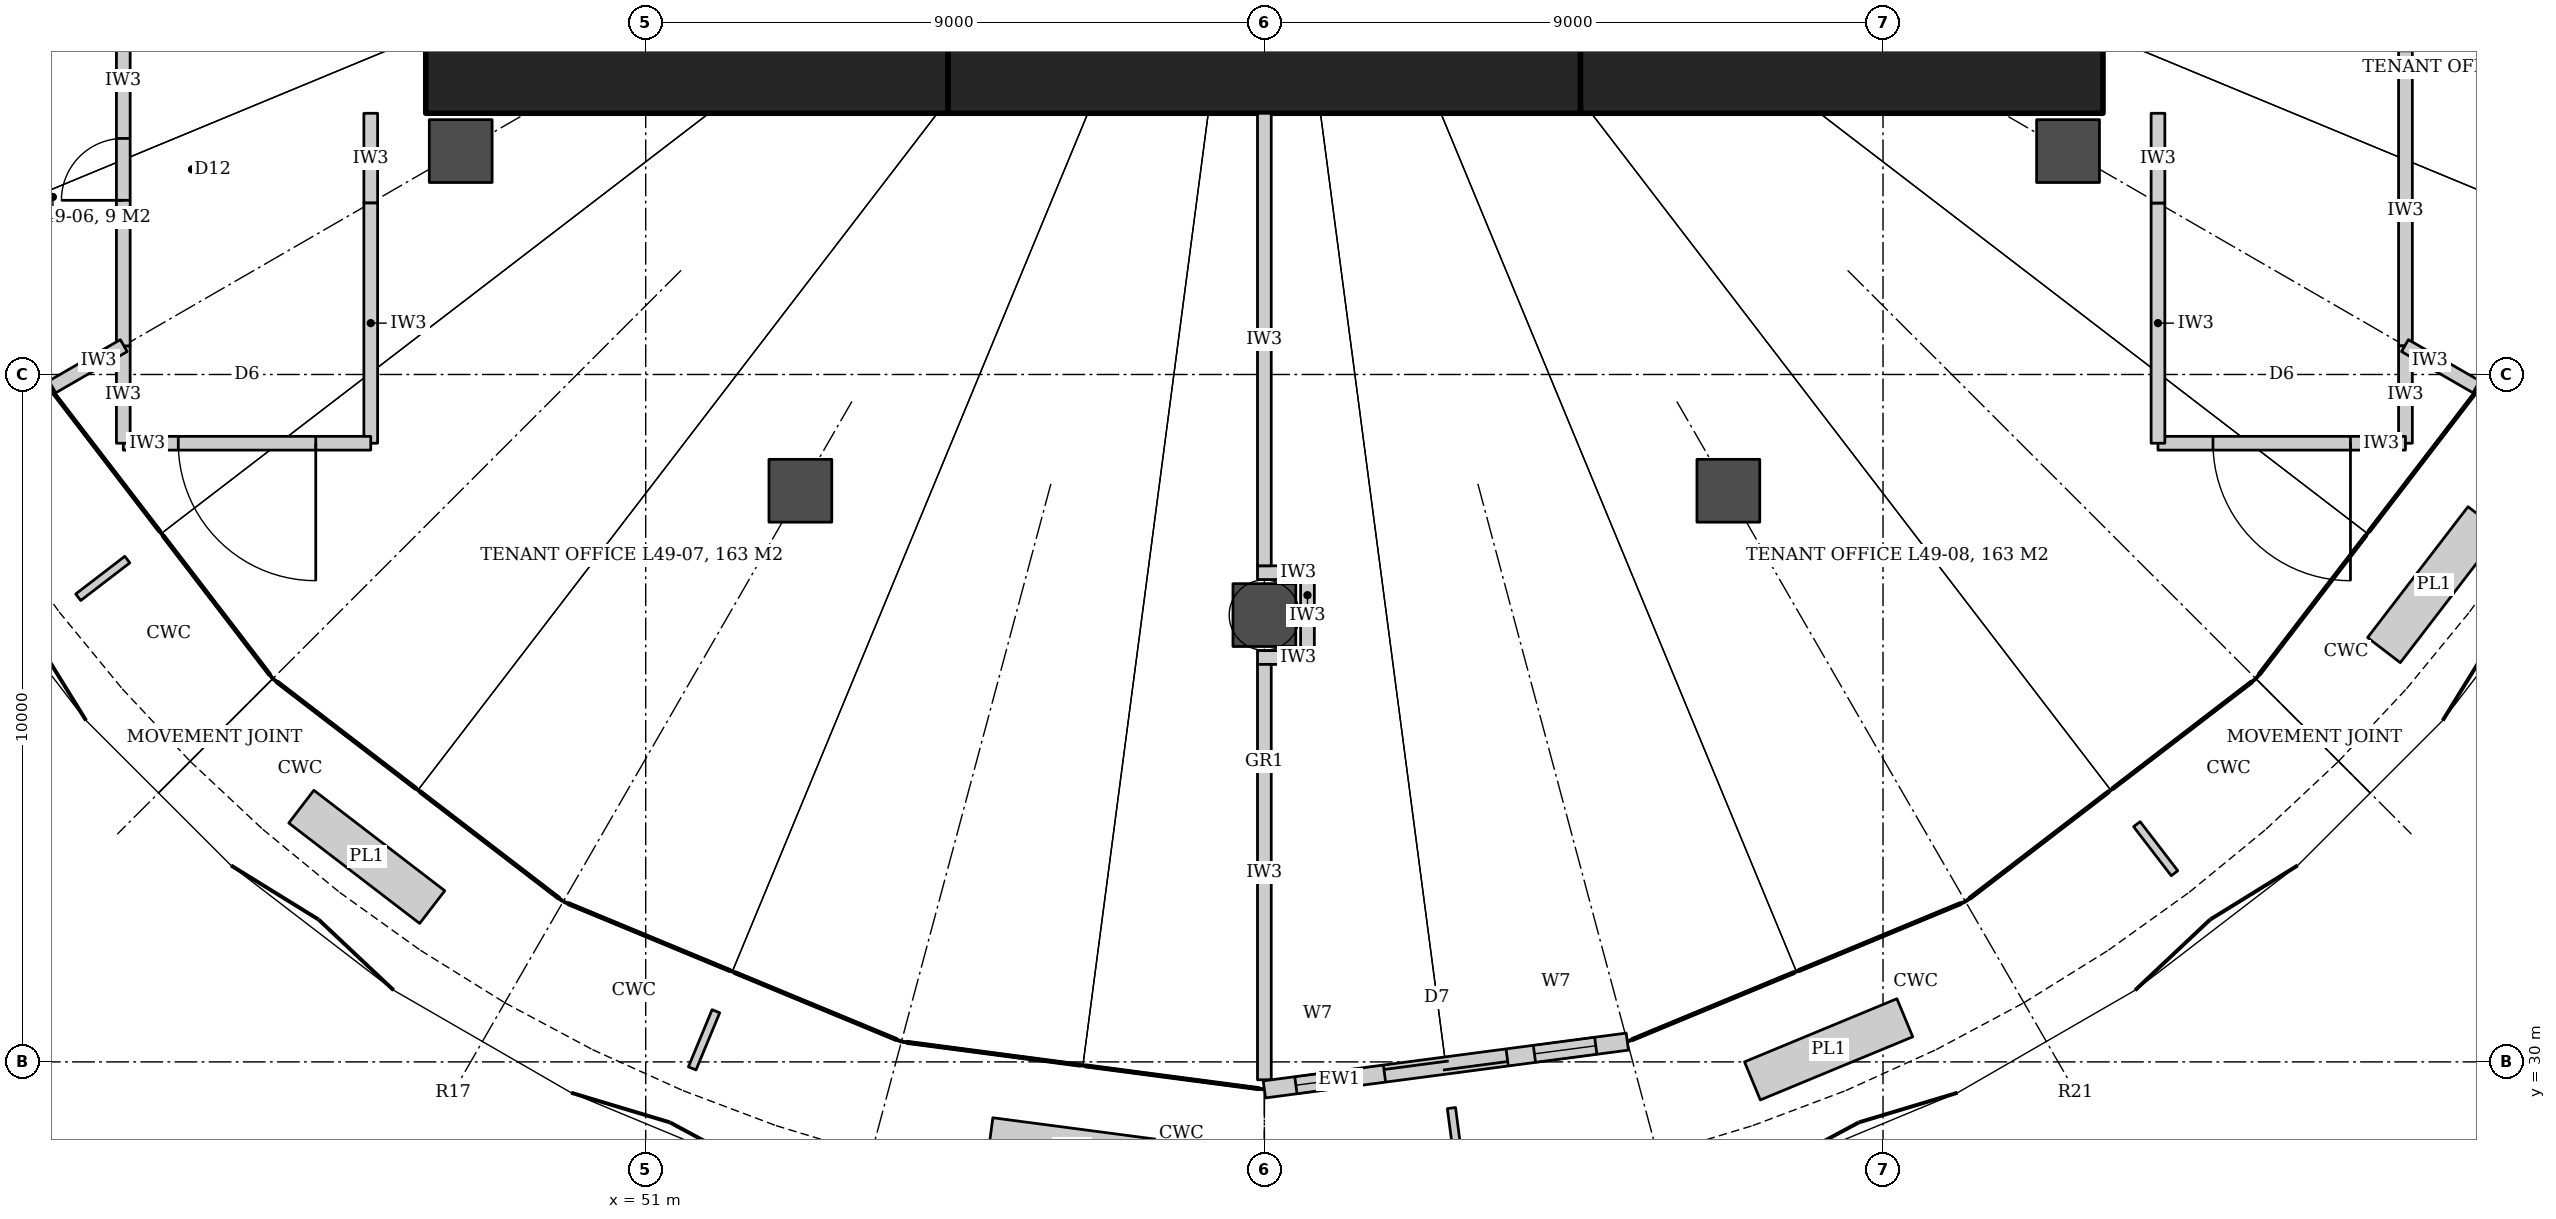
"""IFC4 building model, lengths in metres.
Left out: names, types, materials, properties, quantities, classifications, styles, units other than length and angle.
Written with IfcOpenShell. Run it as: python <this file> out.ifc"""

import sys

from ifc_helpers import new_model, si_unit, direction, frame, frame_2d, origin, origin_2d, place, context, subcontext, project, spatial, rectangle, hollow_circle, extrude, element, fill, save


model = new_model("IFC4")
c1 = context("Model", 3, precision=1e-05, world=origin(), true_north=direction((0.0, 1.0)))
c2 = subcontext(c1, "Body", "Model", "MODEL_VIEW")
j1 = project(units=[si_unit("LENGTHUNIT", "METRE"), si_unit("PLANEANGLEUNIT", "RADIAN")], contexts=[c1])
p1 = place(None, origin())
s1 = spatial("IfcSite", under=j1, at=p1, CompositionType="ELEMENT")
p2 = place(p1, origin())
s2 = spatial("IfcBuilding", under=s1, at=p2, CompositionType="ELEMENT")
p3 = place(p2, frame((0.0, 0.0, 215.0)))
s3 = spatial("IfcBuildingStorey", under=s2, at=p3, CompositionType="ELEMENT", Elevation=215.0)
p4 = place(p3, frame((47.8, 44.55, 0.0), z_axis=(0.0, 0.0, 1.0), x_axis=(1.0, 0.0, 0.0)))
e1 = element("IfcWall", 1, at=p4, inside=s3, PredefinedType="SHEAR", context=c2, shape_type="SweptSolid", body=[
    extrude(rectangle(XDim=7.6, YDim=1.5, at=frame_2d((3.8, 0.0))), origin(), (0.0, 0.0, 1.0), 4.2),
])
p5 = place(p3, frame((55.4, 44.55, 0.0), z_axis=(0.0, 0.0, 1.0), x_axis=(1.0, 0.0, 0.0)))
e2 = element("IfcWall", 2, at=p5, inside=s3, PredefinedType="SHEAR", context=c2, shape_type="SweptSolid", body=[
    extrude(rectangle(XDim=9.2, YDim=1.5, at=frame_2d((4.6, 0.0))), origin(), (0.0, 0.0, 1.0), 4.2),
])
p6 = place(p3, frame((64.6, 44.55, 0.0), z_axis=(0.0, 0.0, 1.0), x_axis=(1.0, 0.0, 0.0)))
e3 = element("IfcWall", 3, at=p6, inside=s3, PredefinedType="SHEAR", context=c2, shape_type="SweptSolid", body=[
    extrude(rectangle(XDim=7.6, YDim=1.5, at=frame_2d((3.8, 0.0))), origin(), (0.0, 0.0, 1.0), 4.2),
])
for number, where, z_axis, x_axis in (
    (4, (48.309, 43.25, 0.0), (0.0, 0.0, 1.0), (1.0, 0.0, 0.0)),
    (5, (53.25, 38.309, 0.0), (0.0, 0.0, 1.0), (1.0, 0.0, 0.0)),
    (6, (60.0, 36.5, 0.0), (0.0, 0.0, 1.0), (1.0, 0.0, 0.0)),
    (7, (66.75, 38.309, 0.0), (0.0, 0.0, 1.0), (1.0, 0.0, 0.0)),
    (8, (71.691, 43.25, 0.0), (0.0, 0.0, 1.0), (1.0, 0.0, 0.0)),
):
    element("IfcColumn", number, at=place(p3, frame(where, z_axis=z_axis, x_axis=x_axis)), inside=s3, PredefinedType="COLUMN", context=c2, shape_type="SweptSolid", body=[
        extrude(hollow_circle(Radius=0.457, WallThickness=0.045, at=origin_2d()), origin(), (0.0, 0.0, 1.0), 4.2),
    ])
p7 = place(p3, frame((76.6, 50.0, 0.0), z_axis=(0.0, 0.0, 1.0), x_axis=(0.0, -1.0, 0.0)))
e9 = element("IfcWall", 9, at=p7, inside=s3, PredefinedType="PARTITIONING", context=c2, shape_type="SweptSolid", body=[
    extrude(rectangle(XDim=9.584, YDim=0.2, at=frame_2d((4.792, 0.0))), origin(), (0.0, 0.0, 1.0), 3.012),
])
p8 = place(p7, frame((4.292, 0.0, 0.0)))
e10 = element("IfcOpeningElement", 10, at=p8, cuts=e9, PredefinedType="OPENING", context=c2, shape_type="SweptSolid", body=[
    extrude(rectangle(XDim=1.0, YDim=2.1, at=frame_2d((0.5, 1.05))), frame((0.0, 0.11, 0.0), z_axis=(0.0, -1.0, 0.0), x_axis=(1.0, 0.0, 0.0)), (0.0, 0.0, 1.0), 0.22),
])
p9 = place(p3, frame((76.6, 40.416, 0.0), z_axis=(0.0, 0.0, 1.0), x_axis=(0.0, -1.0, 0.0)))
e11 = element("IfcWall", 11, at=p9, inside=s3, PredefinedType="PARTITIONING", context=c2, shape_type="SweptSolid", body=[
    extrude(rectangle(XDim=1.416, YDim=0.2, at=frame_2d((0.708, 0.0))), origin(), (0.0, 0.0, 1.0), 3.04),
])
p10 = place(p3, frame((76.6, 39.0, 0.0), z_axis=(0.0, 0.0, 1.0), x_axis=(-1.0, 0.0, 0.0)))
e12 = element("IfcWall", 12, at=p10, inside=s3, PredefinedType="PARTITIONING", context=c2, shape_type="SweptSolid", body=[
    extrude(rectangle(XDim=3.6, YDim=0.2, at=frame_2d((1.8, 0.0))), origin(), (0.0, 0.0, 1.0), 3.012),
])
p11 = place(p10, frame((0.8, 0.0, 0.0)))
e13 = element("IfcOpeningElement", 13, at=p11, cuts=e12, PredefinedType="OPENING", context=c2, shape_type="SweptSolid", body=[
    extrude(rectangle(XDim=2.0, YDim=2.1, at=frame_2d((1.0, 1.05))), frame((0.0, 0.11, 0.0), z_axis=(0.0, -1.0, 0.0), x_axis=(1.0, 0.0, 0.0)), (0.0, 0.0, 1.0), 0.22),
])
p12 = place(p3, frame((73.0, 39.0, 0.0), z_axis=(0.0, 0.0, 1.0), x_axis=(0.0, 1.0, 0.0)))
e14 = element("IfcWall", 14, at=p12, inside=s3, PredefinedType="PARTITIONING", context=c2, shape_type="SweptSolid", body=[
    extrude(rectangle(XDim=3.494, YDim=0.2, at=frame_2d((1.747, 0.0))), origin(), (0.0, 0.0, 1.0), 3.012),
])
for number, where, z_axis, x_axis in (
    (15, (73.0, 42.494, 0.0), (0.0, 0.0, 1.0), (0.0, 1.0, 0.0)),
    (16, (47.0, 43.8, 0.0), (0.0, 0.0, 1.0), (0.0, -1.0, 0.0)),
):
    element("IfcWall", number, at=place(p3, frame(where, z_axis=z_axis, x_axis=x_axis)), inside=s3, PredefinedType="PARTITIONING", context=c2, shape_type="SweptSolid", body=[
        extrude(rectangle(XDim=1.306, YDim=0.2, at=frame_2d((0.653, 0.0))), origin(), (0.0, 0.0, 1.0), 3.04),
    ])
p13 = place(p3, frame((47.0, 42.494, 0.0), z_axis=(0.0, 0.0, 1.0), x_axis=(0.0, -1.0, 0.0)))
e17 = element("IfcWall", 17, at=p13, inside=s3, PredefinedType="PARTITIONING", context=c2, shape_type="SweptSolid", body=[
    extrude(rectangle(XDim=3.494, YDim=0.2, at=frame_2d((1.747, 0.0))), origin(), (0.0, 0.0, 1.0), 3.012),
])
p14 = place(p3, frame((47.0, 39.0, 0.0), z_axis=(0.0, 0.0, 1.0), x_axis=(-1.0, 0.0, 0.0)))
e18 = element("IfcWall", 18, at=p14, inside=s3, PredefinedType="PARTITIONING", context=c2, shape_type="SweptSolid", body=[
    extrude(rectangle(XDim=3.6, YDim=0.2, at=frame_2d((1.8, 0.0))), origin(), (0.0, 0.0, 1.0), 3.012),
])
p15 = place(p14, frame((0.8, 0.0, 0.0)))
e19 = element("IfcOpeningElement", 19, at=p15, cuts=e18, PredefinedType="OPENING", context=c2, shape_type="SweptSolid", body=[
    extrude(rectangle(XDim=2.0, YDim=2.1, at=frame_2d((1.0, 1.05))), frame((0.0, 0.11, 0.0), z_axis=(0.0, -1.0, 0.0), x_axis=(1.0, 0.0, 0.0)), (0.0, 0.0, 1.0), 0.22),
])
p16 = place(p3, frame((43.4, 39.0, 0.0), z_axis=(0.0, 0.0, 1.0), x_axis=(0.0, 1.0, 0.0)))
e20 = element("IfcWall", 20, at=p16, inside=s3, PredefinedType="PARTITIONING", context=c2, shape_type="SweptSolid", body=[
    extrude(rectangle(XDim=1.416, YDim=0.2, at=frame_2d((0.708, 0.0))), origin(), (0.0, 0.0, 1.0), 3.04),
])
p17 = place(p3, frame((43.4, 40.416, 0.0), z_axis=(0.0, 0.0, 1.0), x_axis=(0.0, 1.0, 0.0)))
e21 = element("IfcWall", 21, at=p17, inside=s3, PredefinedType="PARTITIONING", context=c2, shape_type="SweptSolid", body=[
    extrude(rectangle(XDim=5.136, YDim=0.2, at=frame_2d((2.568, 0.0))), origin(), (0.0, 0.0, 1.0), 3.012),
])
p18 = place(p17, frame((2.118, 0.0, 0.0)))
e22 = element("IfcOpeningElement", 22, at=p18, cuts=e21, PredefinedType="OPENING", context=c2, shape_type="SweptSolid", body=[
    extrude(rectangle(XDim=0.9, YDim=2.4, at=frame_2d((0.45, 1.2))), frame((0.0, 0.11, 0.0), z_axis=(0.0, -1.0, 0.0), x_axis=(1.0, 0.0, 0.0)), (0.0, 0.0, 1.0), 0.22),
])
p19 = place(p3, frame((43.406, 45.553, 0.0), z_axis=(0.0, 0.0, 1.0), x_axis=(-0.9659303613, -0.258802119616, 0.0)))
e23 = element("IfcWall", 23, at=p19, inside=s3, PredefinedType="PARTITIONING", context=c2, shape_type="SweptSolid", body=[
    extrude(rectangle(XDim=3.08, YDim=0.2, at=frame_2d((1.54, 0.0))), origin(), (0.0, 0.0, 1.0), 3.04),
])
p20 = place(p3, frame((43.407, 40.42, 0.0), z_axis=(0.0, 0.0, 1.0), x_axis=(-0.866094119867, -0.499880961361, 0.0)))
e24 = element("IfcWall", 24, at=p20, inside=s3, PredefinedType="PARTITIONING", context=c2, shape_type="SweptSolid", body=[
    extrude(rectangle(XDim=1.2, YDim=0.2, at=frame_2d((0.6, 0.0))), origin(), (0.0, 0.0, 1.0), 3.04),
])
for number, where, z_axis, x_axis in (
    (25, (59.9, 37.117, 0.0), (0.0, 0.0, 1.0), (1.0, 0.0, 0.0)),
    (26, (59.9, 35.883, 0.0), (0.0, 0.0, 1.0), (1.0, 0.0, 0.0)),
):
    element("IfcWall", number, at=place(p3, frame(where, z_axis=z_axis, x_axis=x_axis)), inside=s3, PredefinedType="PARTITIONING", context=c2, shape_type="SweptSolid", body=[
        extrude(rectangle(XDim=0.827, YDim=0.2, at=frame_2d((0.414, 0.0))), origin(), (0.0, 0.0, 1.0), 3.02),
    ])
p21 = place(p3, frame((60.627, 37.017, 0.0), z_axis=(0.0, 0.0, 1.0), x_axis=(0.0, -1.0, 0.0)))
e27 = element("IfcWall", 27, at=p21, inside=s3, PredefinedType="PARTITIONING", context=c2, shape_type="SweptSolid", body=[
    extrude(rectangle(XDim=1.034, YDim=0.2, at=frame_2d((0.517, 0.0))), origin(), (0.0, 0.0, 1.0), 3.02),
])
p22 = place(p3, frame((60.0, 43.8, 0.0), z_axis=(0.0, 0.0, 1.0), x_axis=(0.0, -1.0, 0.0)))
e28 = element("IfcWall", 28, at=p22, inside=s3, PredefinedType="PARTITIONING", context=c2, shape_type="SweptSolid", body=[
    extrude(rectangle(XDim=6.583, YDim=0.2, at=frame_2d((3.292, 0.0))), origin(), (0.0, 0.0, 1.0), 3.04),
])
p23 = place(p3, frame((60.0, 35.783, 0.0), z_axis=(0.0, 0.0, 1.0), x_axis=(0.0, -1.0, 0.0)))
e29 = element("IfcWall", 29, at=p23, inside=s3, PredefinedType="PARTITIONING", context=c2, shape_type="SweptSolid", body=[
    extrude(rectangle(XDim=6.043, YDim=0.2, at=frame_2d((3.021, 0.0))), origin(), (0.0, 0.0, 1.0), 3.04),
])
p24 = place(p3, frame((76.593, 40.42, 0.0), z_axis=(0.0, 0.0, 1.0), x_axis=(0.866094119867, -0.499880961361, 0.0)))
e30 = element("IfcWall", 30, at=p24, inside=s3, PredefinedType="PARTITIONING", context=c2, shape_type="SweptSolid", body=[
    extrude(rectangle(XDim=1.2, YDim=0.2, at=frame_2d((0.6, 0.0))), origin(), (0.0, 0.0, 1.0), 3.04),
])
p25 = place(p3, frame((60.0, 29.6, 0.0), z_axis=(0.0, 0.0, 1.0), x_axis=(0.991446335929, 0.130514991371, 0.0)))
e31 = element("IfcWall", 31, at=p25, inside=s3, PredefinedType="SOLIDWALL", context=c2, shape_type="SweptSolid", body=[
    extrude(rectangle(XDim=5.326, YDim=0.25, at=frame_2d((2.663, 0.0))), origin(), (0.0, 0.0, 1.0), 4.04),
])
p26 = place(p25, frame((1.763, 0.0, 0.0)))
e32 = element("IfcOpeningElement", 32, at=p26, cuts=e31, PredefinedType="OPENING", context=c2, shape_type="SweptSolid", body=[
    extrude(rectangle(XDim=1.8, YDim=2.4, at=frame_2d((0.9, 1.2))), frame((0.0, 0.135, 0.0), z_axis=(0.0, -1.0, 0.0), x_axis=(1.0, 0.0, 0.0)), (0.0, 0.0, 1.0), 0.27),
])
p27 = place(p25, frame((0.463, 0.0, 0.0)))
e33 = element("IfcOpeningElement", 33, at=p27, cuts=e31, PredefinedType="OPENING", context=c2, shape_type="SweptSolid", body=[
    extrude(rectangle(XDim=0.9, YDim=2.4, at=frame_2d((0.45, 1.2))), frame((0.0, 0.135, 0.0), z_axis=(0.0, -1.0, 0.0), x_axis=(1.0, 0.0, 0.0)), (0.0, 0.0, 1.0), 0.27),
])
p28 = place(p25, frame((3.963, 0.0, 0.0)))
e34 = element("IfcOpeningElement", 34, at=p28, cuts=e31, PredefinedType="OPENING", context=c2, shape_type="SweptSolid", body=[
    extrude(rectangle(XDim=0.9, YDim=2.4, at=frame_2d((0.45, 1.2))), frame((0.0, 0.135, 0.0), z_axis=(0.0, -1.0, 0.0), x_axis=(1.0, 0.0, 0.0)), (0.0, 0.0, 1.0), 0.27),
])
p29 = place(p18, origin())
e35 = element("IfcDoor", 35, at=p29, inside=s3, OperationType="SINGLE_SWING_LEFT", PredefinedType="DOOR", context=c2, shape_type="SweptSolid", body=[
    extrude(rectangle(XDim=0.9, YDim=2.4, at=frame_2d((0.45, 1.2))), frame((0.0, 0.025, 0.0), z_axis=(0.0, -1.0, 0.0), x_axis=(1.0, 0.0, 0.0)), (0.0, 0.0, 1.0), 0.05),
])
fill(e22, e35)
p30 = place(p15, origin())
e36 = element("IfcDoor", 36, at=p30, inside=s3, OperationType="DOUBLE_DOOR_DOUBLE_SWING", PredefinedType="DOOR", context=c2, shape_type="SweptSolid", body=[
    extrude(rectangle(XDim=2.0, YDim=2.1, at=frame_2d((1.0, 1.05))), frame((0.0, 0.025, 0.0), z_axis=(0.0, -1.0, 0.0), x_axis=(1.0, 0.0, 0.0)), (0.0, 0.0, 1.0), 0.05),
])
fill(e19, e36)
p31 = place(p11, origin())
e37 = element("IfcDoor", 37, at=p31, inside=s3, OperationType="DOUBLE_DOOR_DOUBLE_SWING", PredefinedType="DOOR", context=c2, shape_type="SweptSolid", body=[
    extrude(rectangle(XDim=2.0, YDim=2.1, at=frame_2d((1.0, 1.05))), frame((0.0, 0.025, 0.0), z_axis=(0.0, -1.0, 0.0), x_axis=(1.0, 0.0, 0.0)), (0.0, 0.0, 1.0), 0.05),
])
fill(e13, e37)
p32 = place(p26, origin())
e38 = element("IfcDoor", 38, at=p32, inside=s3, OperationType="DOUBLE_DOOR_SLIDING", PredefinedType="DOOR", context=c2, shape_type="SweptSolid", body=[
    extrude(rectangle(XDim=1.8, YDim=2.4, at=frame_2d((0.9, 1.2))), frame((0.0, 0.025, 0.0), z_axis=(0.0, -1.0, 0.0), x_axis=(1.0, 0.0, 0.0)), (0.0, 0.0, 1.0), 0.05),
])
fill(e32, e38)
p33 = place(p27, origin())
e39 = element("IfcWindow", 39, at=p33, inside=s3, PartitioningType="SINGLE_PANEL", PredefinedType="WINDOW", context=c2, shape_type="SweptSolid", body=[
    extrude(rectangle(XDim=0.9, YDim=2.4, at=frame_2d((0.45, 1.2))), frame((0.0, 0.03, 0.0), z_axis=(0.0, -1.0, 0.0), x_axis=(1.0, 0.0, 0.0)), (0.0, 0.0, 1.0), 0.06),
])
fill(e33, e39)
p34 = place(p28, origin())
e40 = element("IfcWindow", 40, at=p34, inside=s3, PartitioningType="SINGLE_PANEL", PredefinedType="WINDOW", context=c2, shape_type="SweptSolid", body=[
    extrude(rectangle(XDim=0.9, YDim=2.4, at=frame_2d((0.45, 1.2))), frame((0.0, 0.03, 0.0), z_axis=(0.0, -1.0, 0.0), x_axis=(1.0, 0.0, 0.0)), (0.0, 0.0, 1.0), 0.06),
])
fill(e34, e40)
save(model, sys.argv[1])
